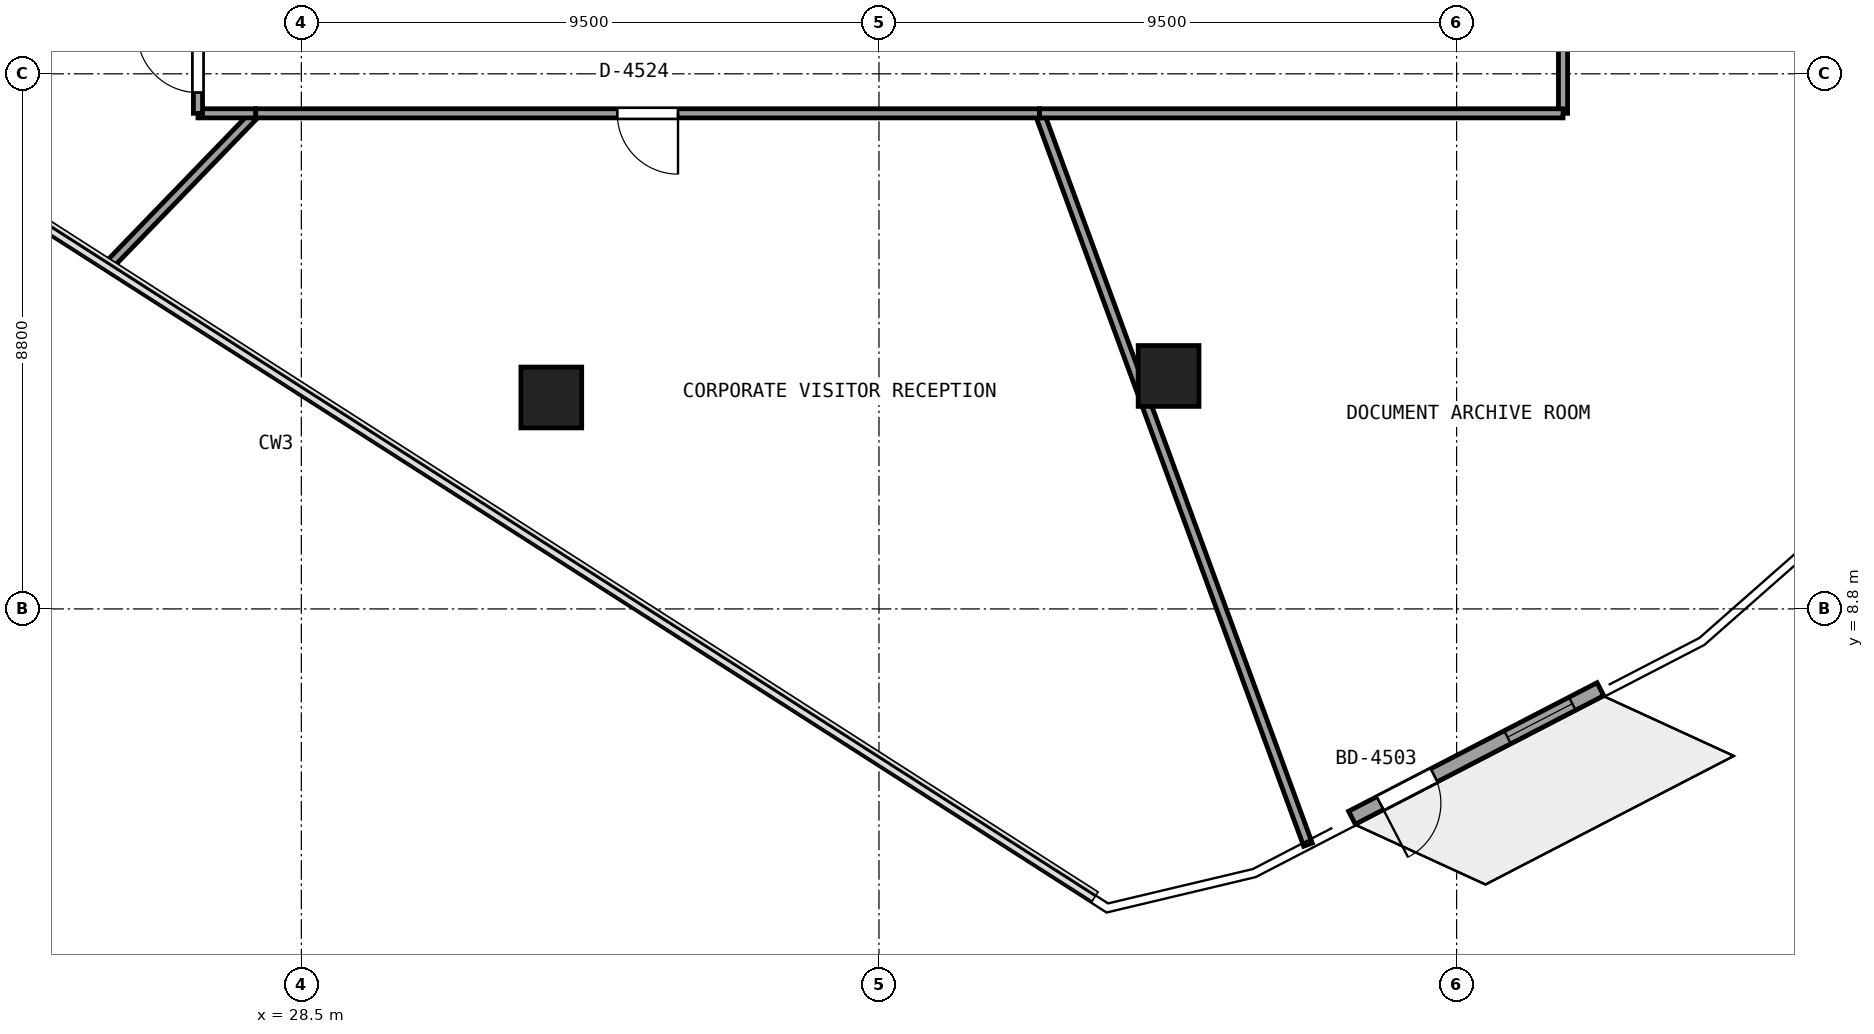
"""IFC4 building model, lengths in metres.
Left out: names, types, materials, properties, quantities, classifications, styles, units other than length and angle.
Written with IfcOpenShell. Run it as: python <this file> out.ifc"""

import sys

from ifc_helpers import new_model, si_unit, direction, frame, frame_2d, origin, origin_2d, place, context, subcontext, project, spatial, rectangle, extrude, element, fill, save


model = new_model("IFC4")
c1 = context("Model", 3, precision=1e-05, world=origin(), true_north=direction((0.0, 1.0)))
c2 = subcontext(c1, "Body", "Model", "MODEL_VIEW")
j1 = project(units=[si_unit("LENGTHUNIT", "METRE"), si_unit("PLANEANGLEUNIT", "RADIAN")], contexts=[c1])
p1 = place(None, origin())
s1 = spatial("IfcSite", under=j1, at=p1, CompositionType="ELEMENT")
p2 = place(p1, origin())
s2 = spatial("IfcBuilding", under=s1, at=p2, CompositionType="ELEMENT")
p3 = place(p2, frame((0.0, 0.0, 168.9)))
s3 = spatial("IfcBuildingStorey", under=s2, at=p3, CompositionType="ELEMENT", Elevation=168.9)
for number, where, z_axis, x_axis in (
    (1, (32.611, 12.277, 0.0), (0.0, 0.0, 1.0), (1.0, 0.0, 0.0)),
    (2, (42.763, 12.631, 0.0), (0.0, 0.0, 1.0), (1.0, 0.0, 0.0)),
):
    element("IfcColumn", number, at=place(p3, frame(where, z_axis=z_axis, x_axis=x_axis)), inside=s3, PredefinedType="COLUMN", context=c2, shape_type="SweptSolid", body=[
        extrude(rectangle(XDim=1.0, YDim=1.0, at=origin_2d()), origin(), (0.0, 0.0, 1.0), 3.24),
    ])
p4 = place(p3, frame((49.865, 7.48, 0.0), z_axis=(0.0, 0.0, 1.0), x_axis=(-0.888164617915, -0.459525419845, 0.0)))
e3 = element("IfcWall", 3, at=p4, inside=s3, PredefinedType="SOLIDWALL", context=c2, shape_type="SweptSolid", body=[
    extrude(rectangle(XDim=4.6, YDim=0.24, at=frame_2d((2.3, 0.0))), origin(), (0.0, 0.0, 1.0), 3.24),
])
p5 = place(p4, frame((3.08, 0.0, 0.0)))
e4 = element("IfcOpeningElement", 4, at=p5, cuts=e3, PredefinedType="OPENING", context=c2, shape_type="SweptSolid", body=[
    extrude(rectangle(XDim=1.0, YDim=2.15, at=frame_2d((0.5, 1.075))), frame((0.0, 0.13, 0.0), z_axis=(0.0, -1.0, 0.0), x_axis=(1.0, 0.0, 0.0)), (0.0, 0.0, 1.0), 0.26),
])
p6 = place(p4, frame((0.52, 0.0, 0.2)))
e5 = element("IfcOpeningElement", 5, at=p6, cuts=e3, PredefinedType="OPENING", context=c2, shape_type="SweptSolid", body=[
    extrude(rectangle(XDim=1.2, YDim=1.8, at=frame_2d((0.6, 0.9))), frame((0.0, 0.13, 0.0), z_axis=(0.0, -1.0, 0.0), x_axis=(1.0, 0.0, 0.0)), (0.0, 0.0, 1.0), 0.26),
])
p7 = place(p3, frame((25.31, 14.426, 0.0), z_axis=(0.0, 0.0, 1.0), x_axis=(0.695043667408, 0.718967523881, 0.0)))
e6 = element("IfcWall", 6, at=p7, inside=s3, PredefinedType="PARTITIONING", context=c2, shape_type="SweptSolid", body=[
    extrude(rectangle(XDim=3.51, YDim=0.15, at=frame_2d((1.755, 0.0))), origin(), (0.0, 0.0, 1.0), 2.725),
])
p8 = place(p3, frame((27.75, 16.95, 0.0), z_axis=(0.0, 0.0, 1.0), x_axis=(-1.0, 0.0, 0.0)))
e7 = element("IfcWall", 7, at=p8, inside=s3, PredefinedType="PARTITIONING", context=c2, shape_type="SweptSolid", body=[
    extrude(rectangle(XDim=0.95, YDim=0.15, at=frame_2d((0.475, 0.0))), origin(), (0.0, 0.0, 1.0), 2.725),
])
p9 = place(p3, frame((26.8, 16.95, 0.0), z_axis=(0.0, 0.0, 1.0), x_axis=(0.0, 1.0, 0.0)))
e8 = element("IfcWall", 8, at=p9, inside=s3, PredefinedType="PARTITIONING", context=c2, shape_type="SweptSolid", body=[
    extrude(rectangle(XDim=1.95, YDim=0.15, at=frame_2d((0.975, 0.0))), origin(), (0.0, 0.0, 1.0), 2.725),
])
p10 = place(p9, frame((0.341, 0.0, 0.0)))
e9 = element("IfcOpeningElement", 9, at=p10, cuts=e8, PredefinedType="OPENING", context=c2, shape_type="SweptSolid", body=[
    extrude(rectangle(XDim=1.0, YDim=2.15, at=frame_2d((0.5, 1.075))), frame((0.0, 0.085, 0.0), z_axis=(0.0, -1.0, 0.0), x_axis=(1.0, 0.0, 0.0)), (0.0, 0.0, 1.0), 0.17),
])
p11 = place(p3, frame((45.055, 4.923, 0.0), z_axis=(0.0, 0.0, 1.0), x_axis=(-0.344611857518, 0.938745262389, 0.0)))
e10 = element("IfcWall", 10, at=p11, inside=s3, PredefinedType="PARTITIONING", context=c2, shape_type="SweptSolid", body=[
    extrude(rectangle(XDim=12.812, YDim=0.15, at=frame_2d((6.406, 0.0))), origin(), (0.0, 0.0, 1.0), 2.725),
])
p12 = place(p3, frame((40.64, 16.95, 0.0), z_axis=(0.0, 0.0, 1.0), x_axis=(-1.0, 0.0, 0.0)))
e11 = element("IfcWall", 11, at=p12, inside=s3, PredefinedType="PARTITIONING", context=c2, shape_type="SweptSolid", body=[
    extrude(rectangle(XDim=12.89, YDim=0.15, at=frame_2d((6.445, 0.0))), origin(), (0.0, 0.0, 1.0), 2.607),
])
p13 = place(p12, frame((5.945, 0.0, 0.0)))
e12 = element("IfcOpeningElement", 12, at=p13, cuts=e11, PredefinedType="OPENING", context=c2, shape_type="SweptSolid", body=[
    extrude(rectangle(XDim=1.0, YDim=2.15, at=frame_2d((0.5, 1.075))), frame((0.0, 0.085, 0.0), z_axis=(0.0, -1.0, 0.0), x_axis=(1.0, 0.0, 0.0)), (0.0, 0.0, 1.0), 0.17),
])
p14 = place(p3, frame((49.25, 18.6, 0.0), z_axis=(0.0, 0.0, 1.0), x_axis=(0.0, -1.0, 0.0)))
e13 = element("IfcWall", 13, at=p14, inside=s3, PredefinedType="PARTITIONING", context=c2, shape_type="SweptSolid", body=[
    extrude(rectangle(XDim=1.65, YDim=0.15, at=frame_2d((0.825, 0.0))), origin(), (0.0, 0.0, 1.0), 3.24),
])
p15 = place(p3, frame((49.25, 16.95, 0.0), z_axis=(0.0, 0.0, 1.0), x_axis=(-1.0, 0.0, 0.0)))
e14 = element("IfcWall", 14, at=p15, inside=s3, PredefinedType="PARTITIONING", context=c2, shape_type="SweptSolid", body=[
    extrude(rectangle(XDim=8.61, YDim=0.15, at=frame_2d((4.305, 0.0))), origin(), (0.0, 0.0, 1.0), 2.607),
])
p16 = place(p5, origin())
e15 = element("IfcDoor", 15, at=p16, inside=s3, OperationType="SINGLE_SWING_RIGHT", PredefinedType="DOOR", context=c2, shape_type="SweptSolid", body=[
    extrude(rectangle(XDim=1.0, YDim=2.15, at=frame_2d((0.5, 1.075))), frame((0.0, 0.025, 0.0), z_axis=(0.0, -1.0, 0.0), x_axis=(1.0, 0.0, 0.0)), (0.0, 0.0, 1.0), 0.05),
])
fill(e4, e15)
p17 = place(p6, origin())
e16 = element("IfcWindow", 16, at=p17, inside=s3, PartitioningType="SINGLE_PANEL", PredefinedType="WINDOW", context=c2, shape_type="SweptSolid", body=[
    extrude(rectangle(XDim=1.2, YDim=1.8, at=frame_2d((0.6, 0.9))), frame((0.0, 0.03, 0.0), z_axis=(0.0, -1.0, 0.0), x_axis=(1.0, 0.0, 0.0)), (0.0, 0.0, 1.0), 0.06),
])
fill(e5, e16)
p18 = place(p10, origin())
e17 = element("IfcDoor", 17, at=p18, inside=s3, OperationType="SINGLE_SWING_RIGHT", PredefinedType="DOOR", context=c2, shape_type="SweptSolid", body=[
    extrude(rectangle(XDim=1.0, YDim=2.15, at=frame_2d((0.5, 1.075))), frame((0.0, 0.025, 0.0), z_axis=(0.0, -1.0, 0.0), x_axis=(1.0, 0.0, 0.0)), (0.0, 0.0, 1.0), 0.05),
])
fill(e9, e17)
p19 = place(p13, origin())
e18 = element("IfcDoor", 18, at=p19, inside=s3, OperationType="SINGLE_SWING_LEFT", PredefinedType="DOOR", context=c2, shape_type="SweptSolid", body=[
    extrude(rectangle(XDim=1.0, YDim=2.15, at=frame_2d((0.5, 1.075))), frame((0.0, 0.025, 0.0), z_axis=(0.0, -1.0, 0.0), x_axis=(1.0, 0.0, 0.0)), (0.0, 0.0, 1.0), 0.05),
])
fill(e12, e18)
save(model, sys.argv[1])
